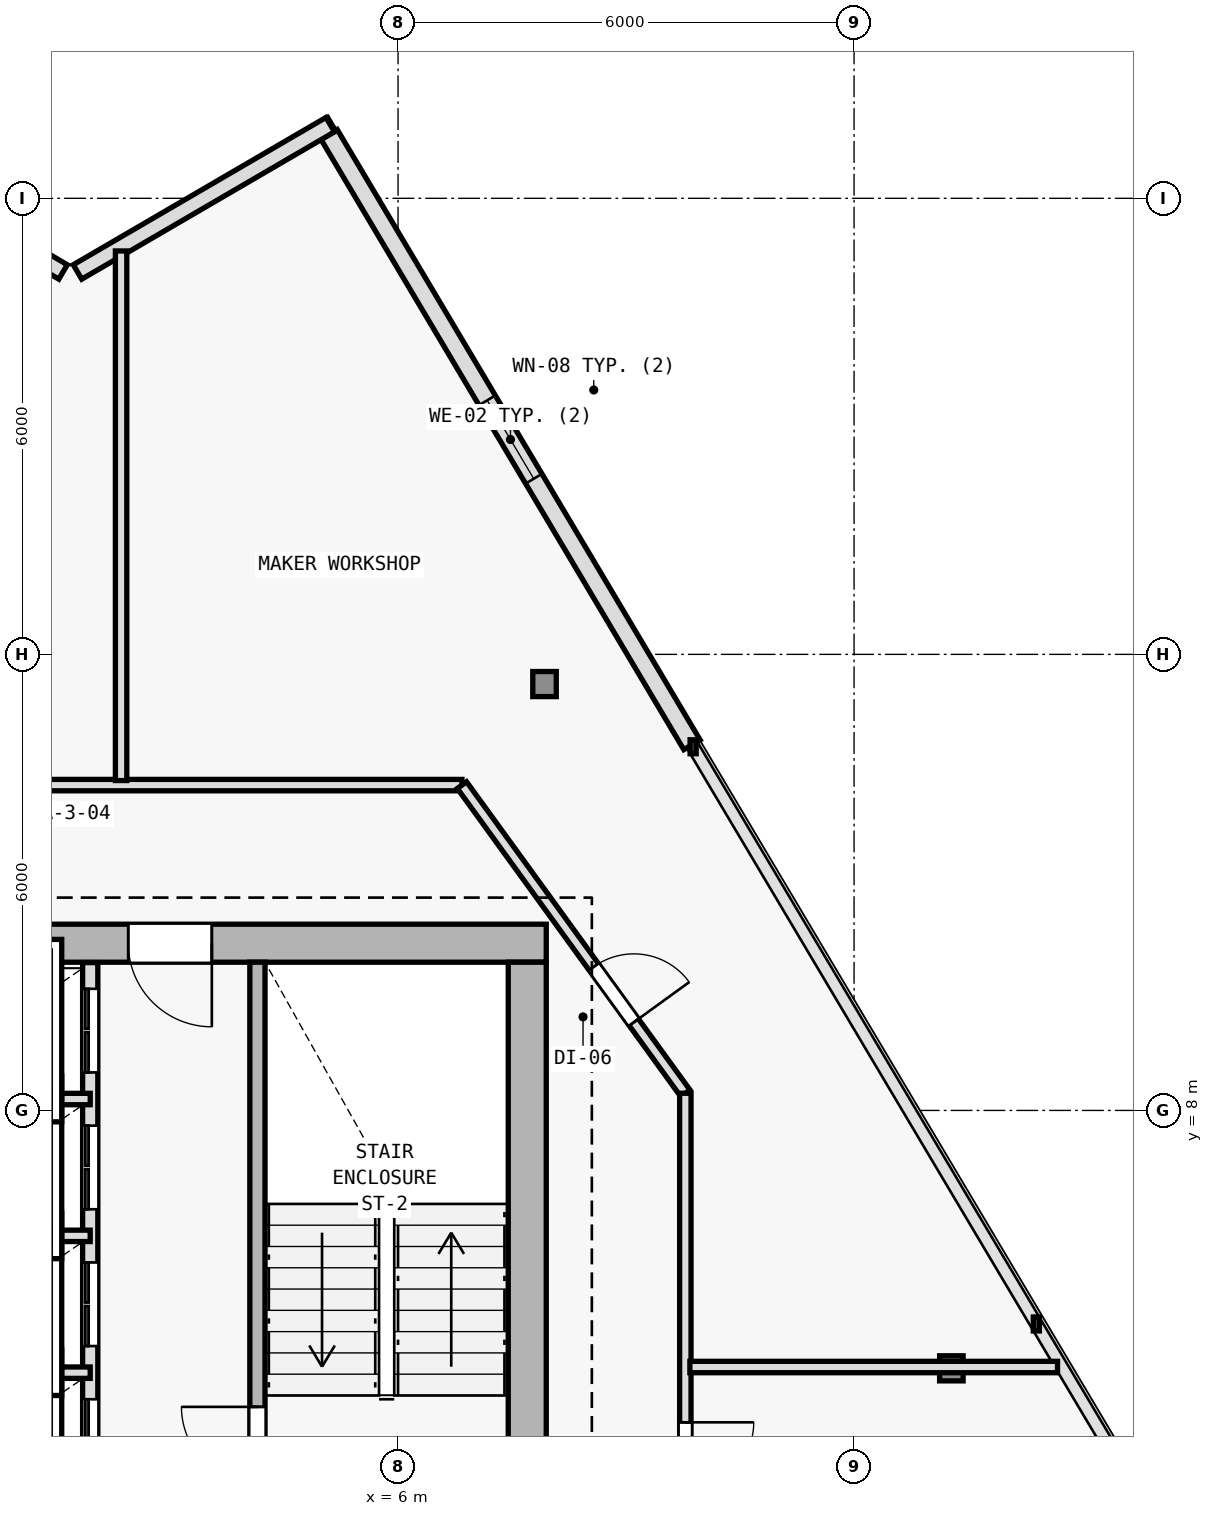
"""IFC4 building model, lengths in metres.
Left out: names, types, materials, properties, quantities, classifications, styles, units other than length and angle.
Written with IfcOpenShell. Run it as: python <this file> out.ifc"""

import sys

from ifc_helpers import new_model, si_unit, direction, frame, frame_2d, origin, origin_2d, place, context, subcontext, project, spatial, rectangle, i_section, extrude, element, fill, save


model = new_model("IFC4")
c1 = context("Model", 3, precision=1e-05, world=origin(), true_north=direction((0.0, 1.0)))
c2 = subcontext(c1, "Body", "Model", "MODEL_VIEW")
j1 = project(units=[si_unit("LENGTHUNIT", "METRE"), si_unit("PLANEANGLEUNIT", "RADIAN")], contexts=[c1])
p1 = place(None, origin())
s1 = spatial("IfcSite", under=j1, at=p1, CompositionType="ELEMENT")
p2 = place(p1, origin())
s2 = spatial("IfcBuilding", under=s1, at=p2, CompositionType="ELEMENT")
p3 = place(p2, frame((0.0, 0.0, 286.8)))
s3 = spatial("IfcBuildingStorey", under=s2, at=p3, CompositionType="ELEMENT", Elevation=286.8)
p4 = place(p3, frame((7.7, 10.2, 0.0), z_axis=(0.0, 0.0, 1.0), x_axis=(1.0, 0.0, 0.0)))
e1 = element("IfcColumn", 1, at=p4, inside=s3, PredefinedType="COLUMN", context=c2, shape_type="SweptSolid", body=[
    extrude(i_section(OverallWidth=0.374, OverallDepth=0.372, WebThickness=0.012, FlangeThickness=0.02, FilletRadius=0.015, at=origin_2d()), origin(), (0.0, 0.0, 1.0), 3.6),
])
p5 = place(p3, frame((13.28, 4.607, 0.005), z_axis=(-0.018906041, 0.009521027842, 0.999775930718), x_axis=(-0.449781931574, -0.893138406984, 0.0)))
e2 = element("IfcColumn", 2, at=p5, inside=s3, PredefinedType="COLUMN", context=c2, shape_type="SweptSolid", body=[
    extrude(i_section(OverallWidth=0.309, OverallDepth=0.33, WebThickness=0.011, FlangeThickness=0.019, FilletRadius=0.027, at=origin_2d()), origin(), (0.0, 0.0, 1.0), 3.59),
])
p6 = place(p3, frame((7.927, 13.609, 0.005), z_axis=(-0.011767052893, -0.002584670578, 0.999927425339), x_axis=(0.214538664031, -0.976715496773, 0.0)))
e3 = element("IfcColumn", 3, at=p6, inside=s3, PredefinedType="COLUMN", context=c2, shape_type="SweptSolid", body=[
    extrude(i_section(OverallWidth=0.309, OverallDepth=0.33, WebThickness=0.011, FlangeThickness=0.019, FilletRadius=0.027, at=origin_2d()), origin(), (0.0, 0.0, 1.0), 3.589),
])
p7 = place(p3, frame((5.091, 20.842, 0.0), z_axis=(0.0, 0.0, 1.0), x_axis=(0.511095217069, -0.859524100354, 0.0)))
e4 = element("IfcWall", 4, at=p7, inside=s3, PredefinedType="SOLIDWALL", context=c2, shape_type="SweptSolid", body=[
    extrude(rectangle(XDim=9.344, YDim=0.25, at=frame_2d((4.672, 0.0))), origin(), (0.0, 0.0, 1.0), 3.35),
])
p8 = place(p7, frame((4.072, 0.0, 0.62)))
e5 = element("IfcOpeningElement", 5, at=p8, cuts=e4, PredefinedType="OPENING", context=c2, shape_type="SweptSolid", body=[
    extrude(rectangle(XDim=1.2, YDim=1.8, at=frame_2d((0.6, 0.9))), frame((0.0, 0.135, 0.0), z_axis=(0.0, -1.0, 0.0), x_axis=(1.0, 0.0, 0.0)), (0.0, 0.0, 1.0), 0.27),
])
p9 = place(p3, frame((1.783, 19.031, 0.0), z_axis=(0.0, 0.0, 1.0), x_axis=(0.863972097652, 0.503539685108, 0.0)))
e6 = element("IfcWall", 6, at=p9, inside=s3, PredefinedType="SOLIDWALL", context=c2, shape_type="SweptSolid", body=[
    extrude(rectangle(XDim=3.849, YDim=0.22, at=frame_2d((1.924, 0.0))), origin(), (0.0, 0.0, 1.0), 3.35),
])
p10 = place(p3, frame((-2.074, 21.186, 0.0), z_axis=(0.0, 0.0, 1.0), x_axis=(0.862137800155, -0.506673872964, 0.0)))
e7 = element("IfcWall", 7, at=p10, inside=s3, PredefinedType="SOLIDWALL", context=c2, shape_type="SweptSolid", body=[
    extrude(rectangle(XDim=4.253, YDim=0.22, at=frame_2d((2.126, 0.0))), origin(), (0.0, 0.0, 1.0), 3.35),
])
p11 = place(p10, frame((1.677, 0.0, 0.62)))
e8 = element("IfcOpeningElement", 8, at=p11, cuts=e7, PredefinedType="OPENING", context=c2, shape_type="SweptSolid", body=[
    extrude(rectangle(XDim=0.9, YDim=1.6, at=frame_2d((0.45, 0.8))), frame((0.0, 0.12, 0.0), z_axis=(0.0, -1.0, 0.0), x_axis=(1.0, 0.0, 0.0)), (0.0, 0.0, 1.0), 0.24),
])
p12 = place(p3, frame((7.95, 10.2, 0.0), z_axis=(0.0, 0.0, 1.0), x_axis=(-1.0, 0.0, 0.0)))
e9 = element("IfcWall", 9, at=p12, inside=s3, PredefinedType="SHEAR", context=c2, shape_type="SweptSolid", body=[
    extrude(rectangle(XDim=15.9, YDim=0.5, at=frame_2d((7.95, 0.0))), origin(), (0.0, 0.0, 1.0), 3.35),
])
p13 = place(p12, frame((4.4, 0.0, 0.0)))
e10 = element("IfcOpeningElement", 10, at=p13, cuts=e9, PredefinedType="OPENING", context=c2, shape_type="SweptSolid", body=[
    extrude(rectangle(XDim=1.1, YDim=2.15, at=frame_2d((0.55, 1.075))), frame((0.0, 0.26, 0.0), z_axis=(0.0, -1.0, 0.0), x_axis=(1.0, 0.0, 0.0)), (0.0, 0.0, 1.0), 0.52),
])
p14 = place(p3, frame((7.7, 9.95, 0.0), z_axis=(0.0, 0.0, 1.0), x_axis=(0.0, -1.0, 0.0)))
e11 = element("IfcWall", 11, at=p14, inside=s3, PredefinedType="SHEAR", context=c2, shape_type="SweptSolid", body=[
    extrude(rectangle(XDim=19.1, YDim=0.5, at=frame_2d((9.55, 0.0))), origin(), (0.0, 0.0, 1.0), 3.35),
])
p15 = place(p3, frame((4.15, 2.75, 0.0), z_axis=(0.0, 0.0, 1.0), x_axis=(0.0, 1.0, 0.0)))
e12 = element("IfcWall", 12, at=p15, inside=s3, PredefinedType="SOLIDWALL", context=c2, shape_type="SweptSolid", body=[
    extrude(rectangle(XDim=7.2, YDim=0.2, at=frame_2d((3.6, 0.0))), origin(), (0.0, 0.0, 1.0), 3.35),
])
p16 = place(p15, frame((0.35, 0.0, 0.0)))
e13 = element("IfcOpeningElement", 13, at=p16, cuts=e12, PredefinedType="OPENING", context=c2, shape_type="SweptSolid", body=[
    extrude(rectangle(XDim=1.0, YDim=2.15, at=frame_2d((0.5, 1.075))), frame((0.0, 0.11, 0.0), z_axis=(0.0, -1.0, 0.0), x_axis=(1.0, 0.0, 0.0)), (0.0, 0.0, 1.0), 0.22),
])
p17 = place(p3, frame((1.95, 2.65, 0.0), z_axis=(0.0, 0.0, 1.0), x_axis=(0.0, 1.0, 0.0)))
e14 = element("IfcWall", 14, at=p17, inside=s3, PredefinedType="SOLIDWALL", context=c2, shape_type="SweptSolid", body=[
    extrude(rectangle(XDim=7.295, YDim=0.2, at=frame_2d((3.647, 0.0))), origin(), (0.0, 0.0, 1.0), 3.35),
])
p18 = place(p17, frame((0.45, 0.0, 0.0)))
e15 = element("IfcOpeningElement", 15, at=p18, cuts=e14, PredefinedType="OPENING", context=c2, shape_type="SweptSolid", body=[
    extrude(rectangle(XDim=1.1, YDim=2.15, at=frame_2d((0.55, 1.075))), frame((0.0, 0.11, 0.0), z_axis=(0.0, -1.0, 0.0), x_axis=(1.0, 0.0, 0.0)), (0.0, 0.0, 1.0), 0.22),
])
p19 = place(p17, frame((2.25, 0.0, 0.0)))
e16 = element("IfcOpeningElement", 16, at=p19, cuts=e14, PredefinedType="OPENING", context=c2, shape_type="SweptSolid", body=[
    extrude(rectangle(XDim=1.1, YDim=2.15, at=frame_2d((0.55, 1.075))), frame((0.0, 0.11, 0.0), z_axis=(0.0, -1.0, 0.0), x_axis=(1.0, 0.0, 0.0)), (0.0, 0.0, 1.0), 0.22),
])
p20 = place(p17, frame((4.05, 0.0, 0.0)))
e17 = element("IfcOpeningElement", 17, at=p20, cuts=e14, PredefinedType="OPENING", context=c2, shape_type="SweptSolid", body=[
    extrude(rectangle(XDim=1.1, YDim=2.15, at=frame_2d((0.55, 1.075))), frame((0.0, 0.11, 0.0), z_axis=(0.0, -1.0, 0.0), x_axis=(1.0, 0.0, 0.0)), (0.0, 0.0, 1.0), 0.22),
])
p21 = place(p17, frame((5.85, 0.0, 0.0)))
e18 = element("IfcOpeningElement", 18, at=p21, cuts=e14, PredefinedType="OPENING", context=c2, shape_type="SweptSolid", body=[
    extrude(rectangle(XDim=1.1, YDim=2.15, at=frame_2d((0.55, 1.075))), frame((0.0, 0.11, 0.0), z_axis=(0.0, -1.0, 0.0), x_axis=(1.0, 0.0, 0.0)), (0.0, 0.0, 1.0), 0.22),
])
for number, where, z_axis, x_axis in (
    (19, (-0.75, 4.55, 0.0), (0.0, 0.0, 1.0), (1.0, 0.0, 0.0)),
    (20, (-0.75, 6.35, 0.0), (0.0, 0.0, 1.0), (1.0, 0.0, 0.0)),
    (21, (-0.75, 8.15, 0.0), (0.0, 0.0, 1.0), (1.0, 0.0, 0.0)),
):
    element("IfcWall", number, at=place(p3, frame(where, z_axis=z_axis, x_axis=x_axis)), inside=s3, PredefinedType="PARTITIONING", context=c2, shape_type="SweptSolid", body=[
        extrude(rectangle(XDim=2.7, YDim=0.15, at=frame_2d((1.35, 0.0))), origin(), (0.0, 0.0, 1.0), 3.35),
    ])
p22 = place(p3, frame((-6.841, 12.28, 0.0), z_axis=(0.0, 0.0, 1.0), x_axis=(1.0, 0.0, 0.0)))
e22 = element("IfcWall", 22, at=p22, inside=s3, PredefinedType="PARTITIONING", context=c2, shape_type="SweptSolid", body=[
    extrude(rectangle(XDim=13.682, YDim=0.15, at=frame_2d((6.841, 0.0))), origin(), (0.0, 0.0, 1.0), 3.015),
])
p23 = place(p22, frame((4.238, 0.0, 0.0)))
e23 = element("IfcOpeningElement", 23, at=p23, cuts=e22, PredefinedType="OPENING", context=c2, shape_type="SweptSolid", body=[
    extrude(rectangle(XDim=0.9, YDim=2.1, at=frame_2d((0.45, 1.05))), frame((0.0, 0.085, 0.0), z_axis=(0.0, -1.0, 0.0), x_axis=(1.0, 0.0, 0.0)), (0.0, 0.0, 1.0), 0.17),
])
p24 = place(p3, frame((6.841, 12.28, 0.0), z_axis=(0.0, 0.0, 1.0), x_axis=(0.586956386413, -0.809618552436, 0.0)))
e24 = element("IfcWall", 24, at=p24, inside=s3, PredefinedType="PARTITIONING", context=c2, shape_type="SweptSolid", body=[
    extrude(rectangle(XDim=5.008, YDim=0.15, at=frame_2d((2.504, 0.0))), origin(), (0.0, 0.0, 1.0), 2.825),
])
p25 = place(p24, frame((2.954, 0.0, 0.0)))
e25 = element("IfcOpeningElement", 25, at=p25, cuts=e24, PredefinedType="OPENING", context=c2, shape_type="SweptSolid", body=[
    extrude(rectangle(XDim=0.9, YDim=2.1, at=frame_2d((0.45, 1.05))), frame((0.0, 0.085, 0.0), z_axis=(0.0, -1.0, 0.0), x_axis=(1.0, 0.0, 0.0)), (0.0, 0.0, 1.0), 0.17),
])
p26 = place(p3, frame((9.78, 8.226, 0.0), z_axis=(0.0, 0.0, 1.0), x_axis=(0.0, -1.0, 0.0)))
e26 = element("IfcWall", 26, at=p26, inside=s3, PredefinedType="PARTITIONING", context=c2, shape_type="SweptSolid", body=[
    extrude(rectangle(XDim=19.706, YDim=0.15, at=frame_2d((9.853, 0.0))), origin(), (0.0, 0.0, 1.0), 2.825),
])
p27 = place(p26, frame((18.021, 0.0, 0.0)))
e27 = element("IfcOpeningElement", 27, at=p27, cuts=e26, PredefinedType="OPENING", context=c2, shape_type="SweptSolid", body=[
    extrude(rectangle(XDim=0.9, YDim=2.1, at=frame_2d((0.45, 1.05))), frame((0.0, 0.085, 0.0), z_axis=(0.0, -1.0, 0.0), x_axis=(1.0, 0.0, 0.0)), (0.0, 0.0, 1.0), 0.17),
])
p28 = place(p26, frame((16.256, 0.0, 0.0)))
e28 = element("IfcOpeningElement", 28, at=p28, cuts=e26, PredefinedType="OPENING", context=c2, shape_type="SweptSolid", body=[
    extrude(rectangle(XDim=0.85, YDim=2.1, at=frame_2d((0.425, 1.05))), frame((0.0, 0.085, 0.0), z_axis=(0.0, -1.0, 0.0), x_axis=(1.0, 0.0, 0.0)), (0.0, 0.0, 1.0), 0.17),
])
p29 = place(p26, frame((14.731, 0.0, 0.0)))
e29 = element("IfcOpeningElement", 29, at=p29, cuts=e26, PredefinedType="OPENING", context=c2, shape_type="SweptSolid", body=[
    extrude(rectangle(XDim=0.85, YDim=2.1, at=frame_2d((0.425, 1.05))), frame((0.0, 0.085, 0.0), z_axis=(0.0, -1.0, 0.0), x_axis=(1.0, 0.0, 0.0)), (0.0, 0.0, 1.0), 0.17),
])
p30 = place(p26, frame((13.023, 0.0, 0.0)))
e30 = element("IfcOpeningElement", 30, at=p30, cuts=e26, PredefinedType="OPENING", context=c2, shape_type="SweptSolid", body=[
    extrude(rectangle(XDim=0.85, YDim=2.1, at=frame_2d((0.425, 1.05))), frame((0.0, 0.085, 0.0), z_axis=(0.0, -1.0, 0.0), x_axis=(1.0, 0.0, 0.0)), (0.0, 0.0, 1.0), 0.17),
])
p31 = place(p26, frame((11.31, 0.0, 0.0)))
e31 = element("IfcOpeningElement", 31, at=p31, cuts=e26, PredefinedType="OPENING", context=c2, shape_type="SweptSolid", body=[
    extrude(rectangle(XDim=0.85, YDim=2.1, at=frame_2d((0.425, 1.05))), frame((0.0, 0.085, 0.0), z_axis=(0.0, -1.0, 0.0), x_axis=(1.0, 0.0, 0.0)), (0.0, 0.0, 1.0), 0.17),
])
p32 = place(p26, frame((9.076, 0.0, 0.0)))
e32 = element("IfcOpeningElement", 32, at=p32, cuts=e26, PredefinedType="OPENING", context=c2, shape_type="SweptSolid", body=[
    extrude(rectangle(XDim=0.9, YDim=2.1, at=frame_2d((0.45, 1.05))), frame((0.0, 0.085, 0.0), z_axis=(0.0, -1.0, 0.0), x_axis=(1.0, 0.0, 0.0)), (0.0, 0.0, 1.0), 0.17),
])
p33 = place(p26, frame((6.611, 0.0, 0.0)))
e33 = element("IfcOpeningElement", 33, at=p33, cuts=e26, PredefinedType="OPENING", context=c2, shape_type="SweptSolid", body=[
    extrude(rectangle(XDim=0.9, YDim=2.1, at=frame_2d((0.45, 1.05))), frame((0.0, 0.085, 0.0), z_axis=(0.0, -1.0, 0.0), x_axis=(1.0, 0.0, 0.0)), (0.0, 0.0, 1.0), 0.17),
])
p34 = place(p26, frame((4.329, 0.0, 0.0)))
e34 = element("IfcOpeningElement", 34, at=p34, cuts=e26, PredefinedType="OPENING", context=c2, shape_type="SweptSolid", body=[
    extrude(rectangle(XDim=0.9, YDim=2.1, at=frame_2d((0.45, 1.05))), frame((0.0, 0.085, 0.0), z_axis=(0.0, -1.0, 0.0), x_axis=(1.0, 0.0, 0.0)), (0.0, 0.0, 1.0), 0.17),
])
p35 = place(p3, frame((9.84, 4.624, 0.0), z_axis=(0.0, 0.0, 1.0), x_axis=(1.0, 0.0, 0.0)))
e35 = element("IfcWall", 35, at=p35, inside=s3, PredefinedType="PARTITIONING", context=c2, shape_type="SweptSolid", body=[
    extrude(rectangle(XDim=4.837, YDim=0.15, at=frame_2d((2.418, 0.0))), origin(), (0.0, 0.0, 1.0), 2.825),
])
p36 = place(p3, frame((2.356, 12.34, 0.0), z_axis=(0.0, 0.0, 1.0), x_axis=(0.0, 1.0, 0.0)))
e36 = element("IfcWall", 36, at=p36, inside=s3, PredefinedType="PARTITIONING", context=c2, shape_type="SweptSolid", body=[
    extrude(rectangle(XDim=6.967, YDim=0.15, at=frame_2d((3.484, 0.0))), origin(), (0.0, 0.0, 1.0), 3.015),
])
p37 = place(p8, origin())
e37 = element("IfcWindow", 37, at=p37, inside=s3, PartitioningType="SINGLE_PANEL", PredefinedType="WINDOW", context=c2, shape_type="SweptSolid", body=[
    extrude(rectangle(XDim=1.2, YDim=1.8, at=frame_2d((0.6, 0.9))), frame((0.0, 0.03, 0.0), z_axis=(0.0, -1.0, 0.0), x_axis=(1.0, 0.0, 0.0)), (0.0, 0.0, 1.0), 0.06),
])
fill(e5, e37)
p38 = place(p13, origin())
e38 = element("IfcDoor", 38, at=p38, inside=s3, OperationType="SINGLE_SWING_LEFT", PredefinedType="DOOR", context=c2, shape_type="SweptSolid", body=[
    extrude(rectangle(XDim=1.1, YDim=2.15, at=frame_2d((0.55, 1.075))), frame((0.0, 0.025, 0.0), z_axis=(0.0, -1.0, 0.0), x_axis=(1.0, 0.0, 0.0)), (0.0, 0.0, 1.0), 0.05),
])
fill(e10, e38)
p39 = place(p16, origin())
e39 = element("IfcDoor", 39, at=p39, inside=s3, OperationType="SINGLE_SWING_RIGHT", PredefinedType="DOOR", context=c2, shape_type="SweptSolid", body=[
    extrude(rectangle(XDim=1.0, YDim=2.15, at=frame_2d((0.5, 1.075))), frame((0.0, 0.025, 0.0), z_axis=(0.0, -1.0, 0.0), x_axis=(1.0, 0.0, 0.0)), (0.0, 0.0, 1.0), 0.05),
])
fill(e13, e39)
p40 = place(p18, origin())
e40 = element("IfcDoor", 40, at=p40, inside=s3, OperationType="DOUBLE_DOOR_SLIDING", PredefinedType="DOOR", context=c2, shape_type="SweptSolid", body=[
    extrude(rectangle(XDim=1.1, YDim=2.15, at=frame_2d((0.55, 1.075))), frame((0.0, 0.025, 0.0), z_axis=(0.0, -1.0, 0.0), x_axis=(1.0, 0.0, 0.0)), (0.0, 0.0, 1.0), 0.05),
])
fill(e15, e40)
p41 = place(p19, origin())
e41 = element("IfcDoor", 41, at=p41, inside=s3, OperationType="DOUBLE_DOOR_SLIDING", PredefinedType="DOOR", context=c2, shape_type="SweptSolid", body=[
    extrude(rectangle(XDim=1.1, YDim=2.15, at=frame_2d((0.55, 1.075))), frame((0.0, 0.025, 0.0), z_axis=(0.0, -1.0, 0.0), x_axis=(1.0, 0.0, 0.0)), (0.0, 0.0, 1.0), 0.05),
])
fill(e16, e41)
p42 = place(p20, origin())
e42 = element("IfcDoor", 42, at=p42, inside=s3, OperationType="DOUBLE_DOOR_SLIDING", PredefinedType="DOOR", context=c2, shape_type="SweptSolid", body=[
    extrude(rectangle(XDim=1.1, YDim=2.15, at=frame_2d((0.55, 1.075))), frame((0.0, 0.025, 0.0), z_axis=(0.0, -1.0, 0.0), x_axis=(1.0, 0.0, 0.0)), (0.0, 0.0, 1.0), 0.05),
])
fill(e17, e42)
p43 = place(p21, origin())
e43 = element("IfcDoor", 43, at=p43, inside=s3, OperationType="DOUBLE_DOOR_SLIDING", PredefinedType="DOOR", context=c2, shape_type="SweptSolid", body=[
    extrude(rectangle(XDim=1.1, YDim=2.15, at=frame_2d((0.55, 1.075))), frame((0.0, 0.025, 0.0), z_axis=(0.0, -1.0, 0.0), x_axis=(1.0, 0.0, 0.0)), (0.0, 0.0, 1.0), 0.05),
])
fill(e18, e43)
p44 = place(p34, origin())
e44 = element("IfcDoor", 44, at=p44, inside=s3, OperationType="SINGLE_SWING_LEFT", PredefinedType="DOOR", context=c2, shape_type="SweptSolid", body=[
    extrude(rectangle(XDim=0.9, YDim=2.1, at=frame_2d((0.45, 1.05))), frame((0.0, 0.025, 0.0), z_axis=(0.0, -1.0, 0.0), x_axis=(1.0, 0.0, 0.0)), (0.0, 0.0, 1.0), 0.05),
])
fill(e34, e44)
p45 = place(p25, origin())
e45 = element("IfcDoor", 45, at=p45, inside=s3, OperationType="SINGLE_SWING_RIGHT", PredefinedType="DOOR", context=c2, shape_type="SweptSolid", body=[
    extrude(rectangle(XDim=0.9, YDim=2.1, at=frame_2d((0.45, 1.05))), frame((0.0, 0.025, 0.0), z_axis=(0.0, -1.0, 0.0), x_axis=(1.0, 0.0, 0.0)), (0.0, 0.0, 1.0), 0.05),
])
fill(e25, e45)
save(model, sys.argv[1])
